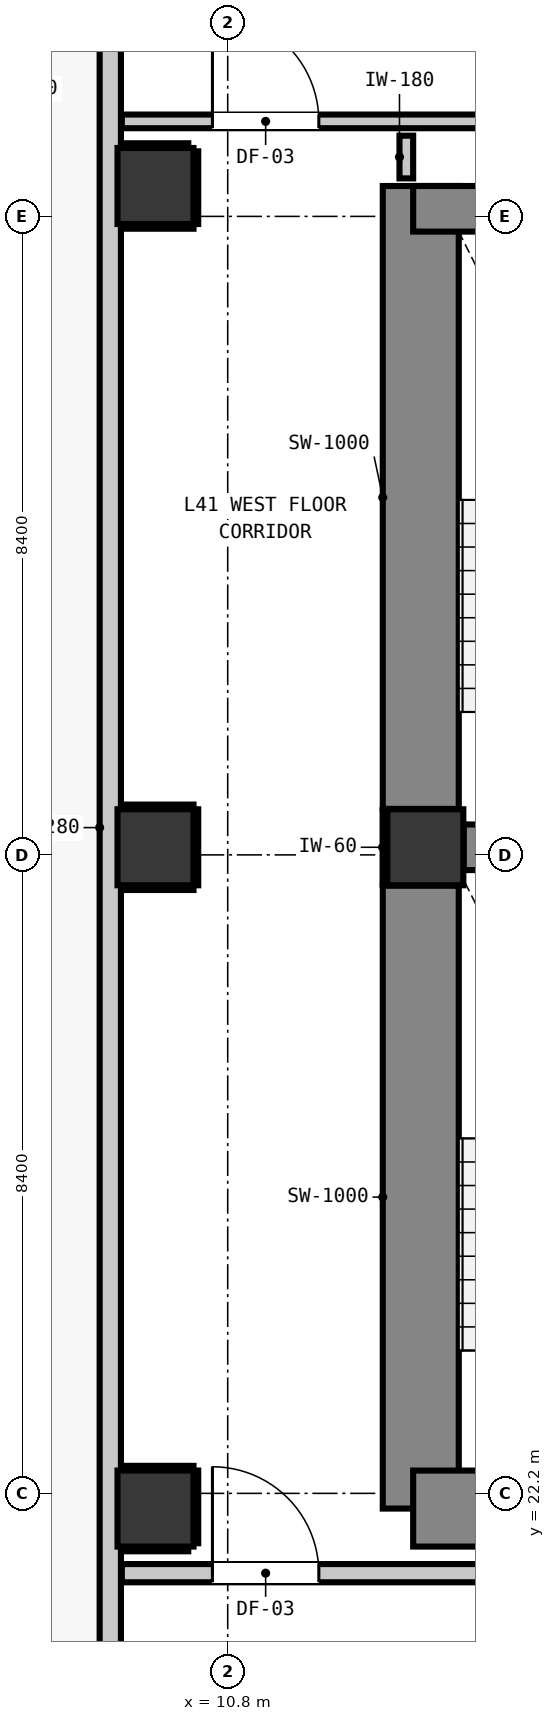
"""IFC4 building model, lengths in metres.
Left out: names, types, materials, properties, quantities, classifications, styles, units other than length and angle.
Written with IfcOpenShell. Run it as: python <this file> out.ifc"""

import sys

from ifc_helpers import new_model, si_unit, direction, frame, frame_2d, origin, origin_2d, place, context, subcontext, project, spatial, rectangle, extrude, element, fill, save


model = new_model("IFC4")
c1 = context("Model", 3, precision=1e-05, world=origin(), true_north=direction((0.0, 1.0)))
c2 = subcontext(c1, "Body", "Model", "MODEL_VIEW")
j1 = project(units=[si_unit("LENGTHUNIT", "METRE"), si_unit("PLANEANGLEUNIT", "RADIAN")], contexts=[c1])
p1 = place(None, origin())
s1 = spatial("IfcSite", under=j1, at=p1, CompositionType="ELEMENT")
p2 = place(p1, origin())
s2 = spatial("IfcBuilding", under=s1, at=p2, CompositionType="ELEMENT")
p3 = place(p2, frame((0.0, 0.0, 142.6)))
s3 = spatial("IfcBuildingStorey", under=s2, at=p3, CompositionType="ELEMENT", Elevation=142.6)
p4 = place(p3, frame((13.4, 30.7, 0.0), z_axis=(0.0, 0.0, 1.0), x_axis=(1.0, 0.0, 0.0)))
e1 = element("IfcColumn", 1, at=p4, inside=s3, PredefinedType="COLUMN", context=c2, shape_type="SweptSolid", body=[
    extrude(rectangle(XDim=1.0, YDim=1.0, at=origin_2d()), origin(), (0.0, 0.0, 1.0), 3.32),
])
p5 = place(p3, frame((13.34, 22.0, 0.0), z_axis=(0.0, 0.0, 1.0), x_axis=(0.0, 1.0, 0.0)))
e2 = element("IfcWall", 2, at=p5, inside=s3, PredefinedType="SHEAR", context=c2, shape_type="SweptSolid", body=[
    extrude(rectangle(XDim=8.195, YDim=1.0, at=frame_2d((4.098, 0.0))), origin(), (0.0, 0.0, 1.0), 3.32),
])
p6 = place(p3, frame((13.34, 31.205, 0.0), z_axis=(0.0, 0.0, 1.0), x_axis=(0.0, 1.0, 0.0)))
e3 = element("IfcWall", 3, at=p6, inside=s3, PredefinedType="SHEAR", context=c2, shape_type="SweptSolid", body=[
    extrude(rectangle(XDim=8.195, YDim=1.0, at=frame_2d((4.097, 0.0))), origin(), (0.0, 0.0, 1.0), 3.32),
])
p7 = place(p3, frame((13.24, 22.0, 0.0), z_axis=(0.0, 0.0, 1.0), x_axis=(1.0, 0.0, 0.0)))
e4 = element("IfcWall", 4, at=p7, inside=s3, PredefinedType="SHEAR", context=c2, shape_type="SweptSolid", body=[
    extrude(rectangle(XDim=4.08, YDim=1.0, at=frame_2d((2.04, 0.0))), origin(), (0.0, 0.0, 1.0), 3.32),
])
p8 = place(p3, frame((13.24, 39.1, 0.0), z_axis=(0.0, 0.0, 1.0), x_axis=(1.0, 0.0, 0.0)))
e5 = element("IfcWall", 5, at=p8, inside=s3, PredefinedType="SHEAR", context=c2, shape_type="SweptSolid", body=[
    extrude(rectangle(XDim=4.08, YDim=0.6, at=frame_2d((2.04, 0.0))), origin(), (0.0, 0.0, 1.0), 3.32),
])
p9 = place(p3, frame((13.905, 30.7, 0.0), z_axis=(0.0, 0.0, 1.0), x_axis=(1.0, 0.0, 0.0)))
e6 = element("IfcWall", 6, at=p9, inside=s3, PredefinedType="SHEAR", context=c2, shape_type="SweptSolid", body=[
    extrude(rectangle(XDim=3.415, YDim=0.6, at=frame_2d((1.708, 0.0))), origin(), (0.0, 0.0, 1.0), 3.32),
])
for number, where, z_axis, x_axis in (
    (7, (9.85, 22.0, 0.0), (0.0, 0.0, 1.0), (1.0, 0.0, 0.0)),
    (8, (9.85, 30.7, 0.0), (0.0, 0.0, 1.0), (1.0, 0.0, 0.0)),
    (9, (9.85, 39.4, 0.0), (0.0, 0.0, 1.0), (1.0, 0.0, 0.0)),
):
    element("IfcColumn", number, at=place(p3, frame(where, z_axis=z_axis, x_axis=x_axis)), inside=s3, PredefinedType="COLUMN", context=c2, shape_type="SweptSolid", body=[
        extrude(rectangle(XDim=1.0, YDim=1.0, at=origin_2d()), origin(), (0.0, 0.0, 1.0), 2.9),
    ])
p10 = place(p3, frame((9.255, 11.355, 0.0), z_axis=(0.0, 0.0, 1.0), x_axis=(0.0, 1.0, 0.0)))
e10 = element("IfcWall", 10, at=p10, inside=s3, PredefinedType="STANDARD", context=c2, shape_type="SweptSolid", body=[
    extrude(rectangle(XDim=32.29, YDim=0.28, at=frame_2d((16.145, 0.0))), origin(), (0.0, 0.0, 1.0), 2.9),
])
p11 = place(p10, frame((5.818, 0.0, 0.0)))
e11 = element("IfcOpeningElement", 11, at=p11, cuts=e10, PredefinedType="OPENING", context=c2, shape_type="SweptSolid", body=[
    extrude(rectangle(XDim=1.0, YDim=2.15, at=frame_2d((0.5, 1.075))), frame((0.0, 0.15, 0.0), z_axis=(0.0, -1.0, 0.0), x_axis=(1.0, 0.0, 0.0)), (0.0, 0.0, 1.0), 0.3),
])
p12 = place(p10, frame((0.544, 0.0, 0.85)))
e12 = element("IfcOpeningElement", 12, at=p12, cuts=e10, PredefinedType="OPENING", context=c2, shape_type="SweptSolid", body=[
    extrude(rectangle(XDim=1.05, YDim=1.65, at=frame_2d((0.525, 0.825))), frame((0.0, 0.15, 0.0), z_axis=(0.0, -1.0, 0.0), x_axis=(1.0, 0.0, 0.0)), (0.0, 0.0, 1.0), 0.3),
])
p13 = place(p3, frame((9.407, 21.15, 0.0), z_axis=(0.0, 0.0, 1.0), x_axis=(1.0, 0.0, 0.0)))
e13 = element("IfcWall", 13, at=p13, inside=s3, PredefinedType="PARTITIONING", context=c2, shape_type="SweptSolid", body=[
    extrude(rectangle(XDim=39.386, YDim=0.24, at=frame_2d((19.693, 0.0))), origin(), (0.0, 0.0, 1.0), 2.9),
])
p14 = place(p13, frame((8.803, 0.0, 0.0)))
e14 = element("IfcOpeningElement", 14, at=p14, cuts=e13, PredefinedType="OPENING", context=c2, shape_type="SweptSolid", body=[
    extrude(rectangle(XDim=1.1, YDim=2.15, at=frame_2d((0.55, 1.075))), frame((0.0, 0.13, 0.0), z_axis=(0.0, -1.0, 0.0), x_axis=(1.0, 0.0, 0.0)), (0.0, 0.0, 1.0), 0.26),
])
p15 = place(p13, frame((1.192, 0.0, 0.0)))
e15 = element("IfcOpeningElement", 15, at=p15, cuts=e13, PredefinedType="OPENING", context=c2, shape_type="SweptSolid", body=[
    extrude(rectangle(XDim=1.4, YDim=2.15, at=frame_2d((0.7, 1.075))), frame((0.0, 0.13, 0.0), z_axis=(0.0, -1.0, 0.0), x_axis=(1.0, 0.0, 0.0)), (0.0, 0.0, 1.0), 0.26),
])
p16 = place(p13, frame((28.643, 0.0, 0.0)))
e16 = element("IfcOpeningElement", 16, at=p16, cuts=e13, PredefinedType="OPENING", context=c2, shape_type="SweptSolid", body=[
    extrude(rectangle(XDim=1.4, YDim=2.15, at=frame_2d((0.7, 1.075))), frame((0.0, 0.13, 0.0), z_axis=(0.0, -1.0, 0.0), x_axis=(1.0, 0.0, 0.0)), (0.0, 0.0, 1.0), 0.26),
])
p17 = place(p3, frame((9.407, 40.25, 0.0), z_axis=(0.0, 0.0, 1.0), x_axis=(1.0, 0.0, 0.0)))
e17 = element("IfcWall", 17, at=p17, inside=s3, PredefinedType="PARTITIONING", context=c2, shape_type="SweptSolid", body=[
    extrude(rectangle(XDim=39.386, YDim=0.18, at=frame_2d((19.693, 0.0))), origin(), (0.0, 0.0, 1.0), 2.9),
])
p18 = place(p17, frame((8.028, 0.0, 0.0)))
e18 = element("IfcOpeningElement", 18, at=p18, cuts=e17, PredefinedType="OPENING", context=c2, shape_type="SweptSolid", body=[
    extrude(rectangle(XDim=1.4, YDim=2.15, at=frame_2d((0.7, 1.075))), frame((0.0, 0.1, 0.0), z_axis=(0.0, -1.0, 0.0), x_axis=(1.0, 0.0, 0.0)), (0.0, 0.0, 1.0), 0.2),
])
p19 = place(p17, frame((1.192, 0.0, 0.0)))
e19 = element("IfcOpeningElement", 19, at=p19, cuts=e17, PredefinedType="OPENING", context=c2, shape_type="SweptSolid", body=[
    extrude(rectangle(XDim=1.4, YDim=2.15, at=frame_2d((0.7, 1.075))), frame((0.0, 0.1, 0.0), z_axis=(0.0, -1.0, 0.0), x_axis=(1.0, 0.0, 0.0)), (0.0, 0.0, 1.0), 0.2),
])
p20 = place(p17, frame((28.643, 0.0, 0.0)))
e20 = element("IfcOpeningElement", 20, at=p20, cuts=e17, PredefinedType="OPENING", context=c2, shape_type="SweptSolid", body=[
    extrude(rectangle(XDim=1.4, YDim=2.15, at=frame_2d((0.7, 1.075))), frame((0.0, 0.1, 0.0), z_axis=(0.0, -1.0, 0.0), x_axis=(1.0, 0.0, 0.0)), (0.0, 0.0, 1.0), 0.2),
])
p21 = place(p17, frame((34.394, 0.0, 0.0)))
e21 = element("IfcOpeningElement", 21, at=p21, cuts=e17, PredefinedType="OPENING", context=c2, shape_type="SweptSolid", body=[
    extrude(rectangle(XDim=0.9, YDim=2.1, at=frame_2d((0.45, 1.05))), frame((0.0, 0.1, 0.0), z_axis=(0.0, -1.0, 0.0), x_axis=(1.0, 0.0, 0.0)), (0.0, 0.0, 1.0), 0.2),
])
p22 = place(p3, frame((13.15, 39.5, 0.0), z_axis=(0.0, 0.0, 1.0), x_axis=(0.0, 1.0, 0.0)))
e22 = element("IfcWall", 22, at=p22, inside=s3, PredefinedType="PARTITIONING", context=c2, shape_type="SweptSolid", body=[
    extrude(rectangle(XDim=0.562, YDim=0.18, at=frame_2d((0.281, 0.0))), origin(), (0.0, 0.0, 1.0), 0.905),
])
p23 = place(p3, frame((12.868, 30.21, 0.0), z_axis=(0.0, 0.0, 1.0), x_axis=(0.0, 1.0, 0.0)))
e23 = element("IfcWall", 23, at=p23, inside=s3, PredefinedType="PARTITIONING", context=c2, shape_type="SweptSolid", body=[
    extrude(rectangle(XDim=0.98, YDim=0.06, at=frame_2d((0.49, 0.0))), origin(), (0.0, 0.0, 1.0), 0.905),
])
p24 = place(p3, frame((9.41, 21.468, 0.0), z_axis=(0.0, 0.0, 1.0), x_axis=(1.0, 0.0, 0.0)))
e24 = element("IfcWall", 24, at=p24, inside=s3, PredefinedType="PARTITIONING", context=c2, shape_type="SweptSolid", body=[
    extrude(rectangle(XDim=0.871, YDim=0.06, at=frame_2d((0.436, 0.0))), origin(), (0.0, 0.0, 1.0), 0.905),
])
p25 = place(p3, frame((9.41, 22.532, 0.0), z_axis=(0.0, 0.0, 1.0), x_axis=(1.0, 0.0, 0.0)))
e25 = element("IfcWall", 25, at=p25, inside=s3, PredefinedType="PARTITIONING", context=c2, shape_type="SweptSolid", body=[
    extrude(rectangle(XDim=0.94, YDim=0.06, at=frame_2d((0.47, 0.0))), origin(), (0.0, 0.0, 1.0), 0.905),
])
p26 = place(p3, frame((10.382, 21.544, 0.0), z_axis=(0.0, 0.0, 1.0), x_axis=(0.0, 1.0, 0.0)))
e26 = element("IfcWall", 26, at=p26, inside=s3, PredefinedType="PARTITIONING", context=c2, shape_type="SweptSolid", body=[
    extrude(rectangle(XDim=0.956, YDim=0.06, at=frame_2d((0.478, 0.0))), origin(), (0.0, 0.0, 1.0), 1.45),
])
for number, where, z_axis, x_axis in (
    (27, (9.41, 30.168, 0.0), (0.0, 0.0, 1.0), (1.0, 0.0, 0.0)),
    (28, (9.41, 31.232, 0.0), (0.0, 0.0, 1.0), (1.0, 0.0, 0.0)),
):
    element("IfcWall", number, at=place(p3, frame(where, z_axis=z_axis, x_axis=x_axis)), inside=s3, PredefinedType="PARTITIONING", context=c2, shape_type="SweptSolid", body=[
        extrude(rectangle(XDim=0.94, YDim=0.06, at=frame_2d((0.47, 0.0))), origin(), (0.0, 0.0, 1.0), 0.905),
    ])
p27 = place(p3, frame((10.382, 30.2, 0.0), z_axis=(0.0, 0.0, 1.0), x_axis=(0.0, 1.0, 0.0)))
e29 = element("IfcWall", 29, at=p27, inside=s3, PredefinedType="PARTITIONING", context=c2, shape_type="SweptSolid", body=[
    extrude(rectangle(XDim=1.0, YDim=0.06, at=frame_2d((0.5, 0.0))), origin(), (0.0, 0.0, 1.0), 1.45),
])
p28 = place(p3, frame((9.41, 38.868, 0.0), z_axis=(0.0, 0.0, 1.0), x_axis=(1.0, 0.0, 0.0)))
e30 = element("IfcWall", 30, at=p28, inside=s3, PredefinedType="PARTITIONING", context=c2, shape_type="SweptSolid", body=[
    extrude(rectangle(XDim=0.94, YDim=0.06, at=frame_2d((0.47, 0.0))), origin(), (0.0, 0.0, 1.0), 0.905),
])
p29 = place(p3, frame((9.41, 39.932, 0.0), z_axis=(0.0, 0.0, 1.0), x_axis=(1.0, 0.0, 0.0)))
e31 = element("IfcWall", 31, at=p29, inside=s3, PredefinedType="PARTITIONING", context=c2, shape_type="SweptSolid", body=[
    extrude(rectangle(XDim=0.871, YDim=0.06, at=frame_2d((0.436, 0.0))), origin(), (0.0, 0.0, 1.0), 0.905),
])
p30 = place(p3, frame((10.382, 38.9, 0.0), z_axis=(0.0, 0.0, 1.0), x_axis=(0.0, 1.0, 0.0)))
e32 = element("IfcWall", 32, at=p30, inside=s3, PredefinedType="PARTITIONING", context=c2, shape_type="SweptSolid", body=[
    extrude(rectangle(XDim=0.956, YDim=0.06, at=frame_2d((0.478, 0.0))), origin(), (0.0, 0.0, 1.0), 1.45),
])
p31 = place(p15, origin())
e33 = element("IfcDoor", 33, at=p31, inside=s3, OperationType="SINGLE_SWING_LEFT", PredefinedType="DOOR", context=c2, shape_type="SweptSolid", body=[
    extrude(rectangle(XDim=1.4, YDim=2.15, at=frame_2d((0.7, 1.075))), frame((0.0, 0.025, 0.0), z_axis=(0.0, -1.0, 0.0), x_axis=(1.0, 0.0, 0.0)), (0.0, 0.0, 1.0), 0.05),
])
fill(e15, e33)
p32 = place(p19, origin())
e34 = element("IfcDoor", 34, at=p32, inside=s3, OperationType="SINGLE_SWING_LEFT", PredefinedType="DOOR", context=c2, shape_type="SweptSolid", body=[
    extrude(rectangle(XDim=1.4, YDim=2.15, at=frame_2d((0.7, 1.075))), frame((0.0, 0.025, 0.0), z_axis=(0.0, -1.0, 0.0), x_axis=(1.0, 0.0, 0.0)), (0.0, 0.0, 1.0), 0.05),
])
fill(e19, e34)
save(model, sys.argv[1])
